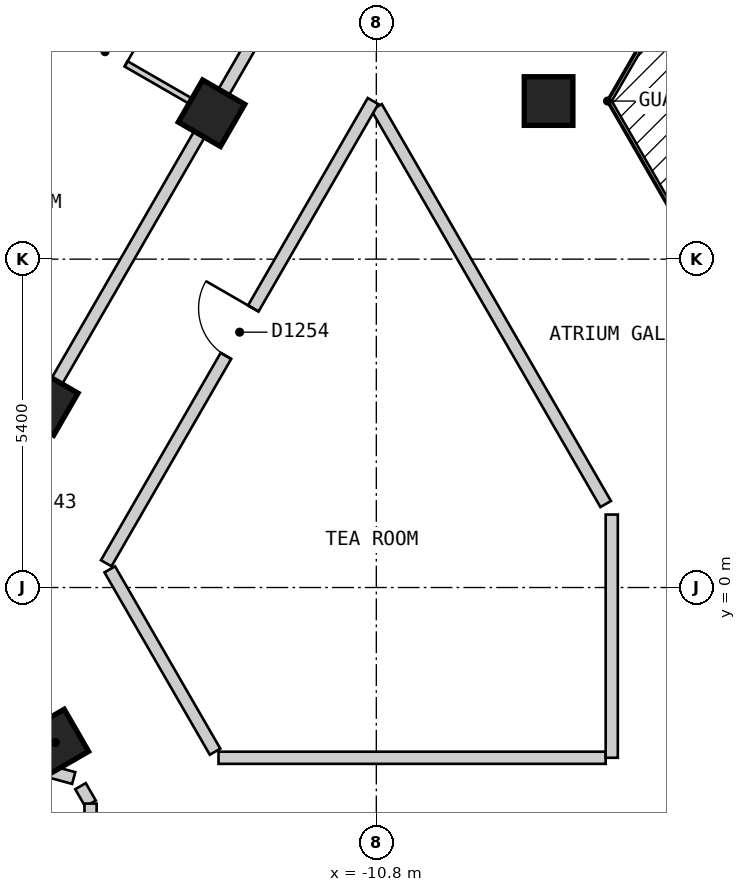
"""IFC4 building model, lengths in metres.
Left out: names, types, materials, properties, quantities, classifications, styles, units other than length and angle.
Written with IfcOpenShell. Run it as: python <this file> out.ifc"""

import sys

from ifc_helpers import new_model, si_unit, direction, frame, frame_2d, origin, origin_2d, place, context, subcontext, project, spatial, polyline, rectangle, outline, extrude, element, fill, save


model = new_model("IFC4")
c1 = context("Model", 3, precision=1e-05, world=origin(), true_north=direction((0.0, 1.0)))
c2 = subcontext(c1, "Body", "Model", "MODEL_VIEW")
j1 = project(units=[si_unit("LENGTHUNIT", "METRE"), si_unit("PLANEANGLEUNIT", "RADIAN")], contexts=[c1])
p1 = place(None, origin())
s1 = spatial("IfcSite", under=j1, at=p1, CompositionType="ELEMENT")
p2 = place(p1, origin())
s2 = spatial("IfcBuilding", under=s1, at=p2, CompositionType="ELEMENT")
p3 = place(p2, frame((0.0, 0.0, 117.6)))
s3 = spatial("IfcBuildingStorey", under=s2, at=p3, CompositionType="ELEMENT", Elevation=117.6)
for number, where, z_axis, x_axis in (
    (1, (-16.079, -2.549, 0.0), (0.0, 0.0, 1.0), (0.5, -0.866, 0.0)),
    (2, (-7.967, 8.0, 0.0), (0.0, 0.0, 1.0), (1.0, 0.0, 0.0)),
    (3, (-13.51, 7.8, 0.0), (0.0, 0.0, 1.0), (-0.5, -0.866, 0.0)),
    (4, (-16.253, 3.05, 0.0), (0.0, 0.0, 1.0), (-0.5, -0.866, 0.0)),
):
    element("IfcColumn", number, at=place(p3, frame(where, z_axis=z_axis, x_axis=x_axis)), inside=s3, PredefinedType="COLUMN", context=c2, shape_type="SweptSolid", body=[
        extrude(rectangle(XDim=0.8, YDim=0.8, at=origin_2d()), origin(), (0.0, 0.0, 1.0), 3.0),
    ])
p4 = place(p3, frame((-28.218, -2.025, 0.0), z_axis=(0.0, 0.0, 1.0), x_axis=(0.500017503135, -0.866015298109, 0.0)))
e5 = element("IfcWall", 5, at=p4, inside=s3, PredefinedType="SOLIDWALL", context=c2, shape_type="SweptSolid", body=[
    extrude(outline(polyline([(0.0, -0.15), (24.711, -0.15), (24.631, 0.15), (0.08, 0.15), (0.0, -0.15)])), origin(), (0.0, 0.0, 1.0), 2.7),
])
p5 = place(p4, frame((2.857, 0.0, 0.15)))
e6 = element("IfcOpeningElement", 6, at=p5, cuts=e5, PredefinedType="OPENING", context=c2, shape_type="SweptSolid", body=[
    extrude(rectangle(XDim=1.5, YDim=2.1, at=frame_2d((0.75, 1.05))), frame((0.0, 0.16, 0.0), z_axis=(0.0, -1.0, 0.0), x_axis=(1.0, 0.0, 0.0)), (0.0, 0.0, 1.0), 0.32),
])
p6 = place(p4, frame((8.689, 0.0, 0.15)))
e7 = element("IfcOpeningElement", 7, at=p6, cuts=e5, PredefinedType="OPENING", context=c2, shape_type="SweptSolid", body=[
    extrude(rectangle(XDim=1.5, YDim=2.1, at=frame_2d((0.75, 1.05))), frame((0.0, 0.16, 0.0), z_axis=(0.0, -1.0, 0.0), x_axis=(1.0, 0.0, 0.0)), (0.0, 0.0, 1.0), 0.32),
])
p7 = place(p4, frame((14.52, 0.0, 0.15)))
e8 = element("IfcOpeningElement", 8, at=p7, cuts=e5, PredefinedType="OPENING", context=c2, shape_type="SweptSolid", body=[
    extrude(rectangle(XDim=1.5, YDim=2.1, at=frame_2d((0.75, 1.05))), frame((0.0, 0.16, 0.0), z_axis=(0.0, -1.0, 0.0), x_axis=(1.0, 0.0, 0.0)), (0.0, 0.0, 1.0), 0.32),
])
p8 = place(p4, frame((20.351, 0.0, 0.15)))
e9 = element("IfcOpeningElement", 9, at=p8, cuts=e5, PredefinedType="OPENING", context=c2, shape_type="SweptSolid", body=[
    extrude(rectangle(XDim=1.5, YDim=2.1, at=frame_2d((0.75, 1.05))), frame((0.0, 0.16, 0.0), z_axis=(0.0, -1.0, 0.0), x_axis=(1.0, 0.0, 0.0)), (0.0, 0.0, 1.0), 0.32),
])
p9 = place(p3, frame((-10.796, 7.9, 0.0), z_axis=(0.0, 0.0, 1.0), x_axis=(0.499954271211, -0.866051803703, 0.0)))
e10 = element("IfcWall", 10, at=p9, inside=s3, PredefinedType="PARTITIONING", context=c2, shape_type="SweptSolid", body=[
    extrude(rectangle(XDim=7.536, YDim=0.2, at=frame_2d((3.768, 0.0))), origin(), (0.0, 0.0, 1.0), 2.7),
])
p10 = place(p3, frame((-15.184, 0.299, 0.0), z_axis=(0.0, 0.0, 1.0), x_axis=(0.500149577091, -0.865939028186, 0.0)))
e11 = element("IfcWall", 11, at=p10, inside=s3, PredefinedType="PARTITIONING", context=c2, shape_type="SweptSolid", body=[
    extrude(rectangle(XDim=3.463, YDim=0.2, at=frame_2d((1.732, 0.0))), origin(), (0.0, 0.0, 1.0), 2.7),
])
p11 = place(p3, frame((-17.724, 0.299, 0.0), z_axis=(0.0, 0.0, 1.0), x_axis=(0.499910220442, -0.866077231832, 0.0)))
e12 = element("IfcWall", 12, at=p11, inside=s3, PredefinedType="PARTITIONING", context=c2, shape_type="SweptSolid", body=[
    extrude(rectangle(XDim=3.189, YDim=0.2, at=frame_2d((1.594, 0.0))), origin(), (0.0, 0.0, 1.0), 2.7),
])
p12 = place(p3, frame((-15.665, -3.267, 0.0), z_axis=(0.0, 0.0, 1.0), x_axis=(0.499957196903, -0.866050114754, 0.0)))
e13 = element("IfcWall", 13, at=p12, inside=s3, PredefinedType="PARTITIONING", context=c2, shape_type="SweptSolid", body=[
    extrude(rectangle(XDim=0.33, YDim=0.2, at=frame_2d((0.165, 0.0))), origin(), (0.0, 0.0, 1.0), 2.7),
])
p13 = place(p3, frame((-13.395, -2.8, 0.0), z_axis=(0.0, 0.0, 1.0), x_axis=(1.0, 0.0, 0.0)))
e14 = element("IfcWall", 14, at=p13, inside=s3, PredefinedType="PARTITIONING", context=c2, shape_type="SweptSolid", body=[
    extrude(rectangle(XDim=6.367, YDim=0.2, at=frame_2d((3.184, 0.0))), origin(), (0.0, 0.0, 1.0), 2.7),
])
p14 = place(p3, frame((-15.242, 0.399, 0.0), z_axis=(0.0, 0.0, 1.0), x_axis=(0.499953615651, 0.866052182145, 0.0)))
e15 = element("IfcWall", 15, at=p14, inside=s3, PredefinedType="PARTITIONING", context=c2, shape_type="SweptSolid", body=[
    extrude(rectangle(XDim=8.777, YDim=0.2, at=frame_2d((4.388, 0.0))), origin(), (0.0, 0.0, 1.0), 2.7),
])
p15 = place(p14, frame((3.938, 0.0, 0.0)))
e16 = element("IfcOpeningElement", 16, at=p15, cuts=e15, PredefinedType="OPENING", context=c2, shape_type="SweptSolid", body=[
    extrude(rectangle(XDim=0.9, YDim=2.1, at=frame_2d((0.45, 1.05))), frame((0.0, 0.11, 0.0), z_axis=(0.0, -1.0, 0.0), x_axis=(1.0, 0.0, 0.0)), (0.0, 0.0, 1.0), 0.22),
])
p16 = place(p3, frame((-17.753, 0.45, 0.0), z_axis=(0.0, 0.0, 1.0), x_axis=(0.499988552313, 0.866032013009, 0.0)))
e17 = element("IfcWall", 17, at=p16, inside=s3, PredefinedType="PARTITIONING", context=c2, shape_type="SweptSolid", body=[
    extrude(rectangle(XDim=16.917, YDim=0.2, at=frame_2d((8.458, 0.0))), origin(), (0.0, 0.0, 1.0), 2.7),
])
p17 = place(p16, frame((10.73, 0.0, 0.0)))
e18 = element("IfcOpeningElement", 18, at=p17, cuts=e17, PredefinedType="OPENING", context=c2, shape_type="SweptSolid", body=[
    extrude(rectangle(XDim=1.0, YDim=2.1, at=frame_2d((0.5, 1.05))), frame((0.0, 0.11, 0.0), z_axis=(0.0, -1.0, 0.0), x_axis=(1.0, 0.0, 0.0)), (0.0, 0.0, 1.0), 0.22),
])
p18 = place(p16, frame((0.594, 0.0, 0.0)))
e19 = element("IfcOpeningElement", 19, at=p18, cuts=e17, PredefinedType="OPENING", context=c2, shape_type="SweptSolid", body=[
    extrude(rectangle(XDim=1.0, YDim=2.1, at=frame_2d((0.5, 1.05))), frame((0.0, 0.11, 0.0), z_axis=(0.0, -1.0, 0.0), x_axis=(1.0, 0.0, 0.0)), (0.0, 0.0, 1.0), 0.22),
])
p19 = place(p3, frame((-6.928, -2.8, 0.0), z_axis=(0.0, 0.0, 1.0), x_axis=(0.0, 1.0, 0.0)))
e20 = element("IfcWall", 20, at=p19, inside=s3, PredefinedType="PARTITIONING", context=c2, shape_type="SweptSolid", body=[
    extrude(rectangle(XDim=4.0, YDim=0.2, at=frame_2d((2.0, 0.0))), origin(), (0.0, 0.0, 1.0), 2.7),
])
p20 = place(p3, frame((-15.5, -6.6, 0.0), z_axis=(0.0, 0.0, 1.0), x_axis=(0.0, 1.0, 0.0)))
e21 = element("IfcWall", 21, at=p20, inside=s3, PredefinedType="PARTITIONING", context=c2, shape_type="SweptSolid", body=[
    extrude(rectangle(XDim=3.047, YDim=0.2, at=frame_2d((1.523, 0.0))), origin(), (0.0, 0.0, 1.0), 2.7),
])
p21 = place(p3, frame((-19.706, 5.16, 0.0), z_axis=(0.0, 0.0, 1.0), x_axis=(0.500003799672, 0.866023210032, 0.0)))
e22 = element("IfcWall", 22, at=p21, inside=s3, PredefinedType="PARTITIONING", context=c2, shape_type="SweptSolid", body=[
    extrude(rectangle(XDim=16.15, YDim=0.1, at=frame_2d((8.075, 0.0))), origin(), (0.0, 0.0, 1.0), 2.7),
])
p22 = place(p21, frame((7.677, 0.0, 0.0)))
e23 = element("IfcOpeningElement", 23, at=p22, cuts=e22, PredefinedType="OPENING", context=c2, shape_type="SweptSolid", body=[
    extrude(rectangle(XDim=0.9, YDim=2.1, at=frame_2d((0.45, 1.05))), frame((0.0, 0.06, 0.0), z_axis=(0.0, -1.0, 0.0), x_axis=(1.0, 0.0, 0.0)), (0.0, 0.0, 1.0), 0.12),
])
p23 = place(p3, frame((-16.493, -2.938, 0.0), z_axis=(0.0, 0.0, 1.0), x_axis=(0.964816958114, -0.262922493019, 0.0)))
e24 = element("IfcWall", 24, at=p23, inside=s3, PredefinedType="PARTITIONING", context=c2, shape_type="SweptSolid", body=[
    extrude(rectangle(XDim=0.742, YDim=0.2, at=frame_2d((0.371, 0.0))), origin(), (0.0, 0.0, 1.0), 2.7),
])
p24 = place(p3, frame((-24.826, -7.599, 0.0), z_axis=(0.0, 0.0, 1.0), x_axis=(0.86599621094, 0.500050560081, 0.0)))
e25 = element("IfcWall", 25, at=p24, inside=s3, PredefinedType="PARTITIONING", context=c2, shape_type="SweptSolid", body=[
    extrude(rectangle(XDim=10.069, YDim=0.2, at=frame_2d((5.035, 0.0))), origin(), (0.0, 0.0, 1.0), 2.7),
])
p25 = place(p3, frame((-17.014, 9.823, 0.0), z_axis=(0.0, 0.0, 1.0), x_axis=(0.866076396086, -0.499911668341, 0.0)))
e26 = element("IfcWall", 26, at=p25, inside=s3, PredefinedType="PARTITIONING", context=c2, shape_type="SweptSolid", body=[
    extrude(rectangle(XDim=3.947, YDim=0.1, at=frame_2d((1.973, 0.0))), origin(), (0.0, 0.0, 1.0), 2.7),
])
p26 = place(p25, frame((1.623, 0.0, 0.0)))
e27 = element("IfcOpeningElement", 27, at=p26, cuts=e26, PredefinedType="OPENING", context=c2, shape_type="SweptSolid", body=[
    extrude(rectangle(XDim=0.8, YDim=2.1, at=frame_2d((0.4, 1.05))), frame((0.0, 0.06, 0.0), z_axis=(0.0, -1.0, 0.0), x_axis=(1.0, 0.0, 0.0)), (0.0, 0.0, 1.0), 0.12),
])
p27 = place(p26, origin())
e28 = element("IfcDoor", 28, at=p27, inside=s3, OperationType="SINGLE_SWING_RIGHT", PredefinedType="DOOR", context=c2, shape_type="SweptSolid", body=[
    extrude(rectangle(XDim=0.8, YDim=2.1, at=frame_2d((0.4, 1.05))), frame((0.0, 0.025, 0.0), z_axis=(0.0, -1.0, 0.0), x_axis=(1.0, 0.0, 0.0)), (0.0, 0.0, 1.0), 0.05),
])
fill(e27, e28)
p28 = place(p15, origin())
e29 = element("IfcDoor", 29, at=p28, inside=s3, OperationType="SINGLE_SWING_RIGHT", PredefinedType="DOOR", context=c2, shape_type="SweptSolid", body=[
    extrude(rectangle(XDim=0.9, YDim=2.1, at=frame_2d((0.45, 1.05))), frame((0.0, 0.025, 0.0), z_axis=(0.0, -1.0, 0.0), x_axis=(1.0, 0.0, 0.0)), (0.0, 0.0, 1.0), 0.05),
])
fill(e16, e29)
save(model, sys.argv[1])
